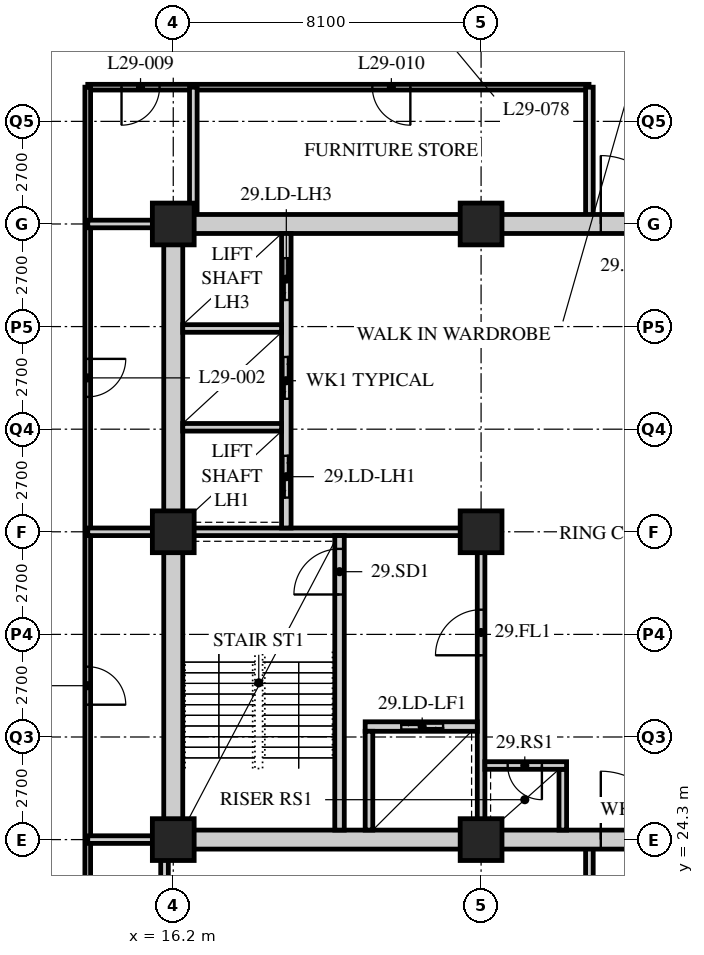
"""IFC4 building model, lengths in metres.
Left out: names, types, materials, properties, quantities, classifications, styles, units other than length and angle.
Written with IfcOpenShell. Run it as: python <this file> out.ifc"""

import sys

from ifc_helpers import new_model, si_unit, direction, frame, frame_2d, origin, origin_2d, place, context, subcontext, project, spatial, rectangle, hollow_rectangle, extrude, element, fill, save


model = new_model("IFC4")
c1 = context("Model", 3, precision=1e-05, world=origin(), true_north=direction((0.0, 1.0)))
c2 = subcontext(c1, "Body", "Model", "MODEL_VIEW")
j1 = project(units=[si_unit("LENGTHUNIT", "METRE"), si_unit("PLANEANGLEUNIT", "RADIAN")], contexts=[c1])
p1 = place(None, origin())
s1 = spatial("IfcSite", under=j1, at=p1, CompositionType="ELEMENT")
p2 = place(p1, origin())
s2 = spatial("IfcBuilding", under=s1, at=p2, CompositionType="ELEMENT")
p3 = place(p2, frame((0.0, 0.0, 117.0)))
s3 = spatial("IfcBuildingStorey", under=s2, at=p3, CompositionType="ELEMENT", Elevation=117.0)
for number, where, z_axis, x_axis in (
    (1, (16.2, 24.3, 0.0), (0.0, 0.0, 1.0), (1.0, 0.0, 0.0)),
    (2, (16.2, 32.4, 0.0), (0.0, 0.0, 1.0), (1.0, 0.0, 0.0)),
    (3, (16.2, 40.5, 0.0), (0.0, 0.0, 1.0), (1.0, 0.0, 0.0)),
    (4, (24.3, 24.3, 0.0), (0.0, 0.0, 1.0), (1.0, 0.0, 0.0)),
    (5, (24.3, 32.4, 0.0), (0.0, 0.0, 1.0), (1.0, 0.0, 0.0)),
    (6, (24.3, 40.5, 0.0), (0.0, 0.0, 1.0), (1.0, 0.0, 0.0)),
):
    element("IfcColumn", number, at=place(p3, frame(where, z_axis=z_axis, x_axis=x_axis)), inside=s3, PredefinedType="COLUMN", context=c2, shape_type="SweptSolid", body=[
        extrude(hollow_rectangle(XDim=1.1, YDim=1.1, WallThickness=0.1, at=origin_2d()), origin(), (0.0, 0.0, 1.0), 3.4),
    ])
p4 = place(p3, frame((27.14, 44.1, 0.0), z_axis=(0.0, 0.0, 1.0), x_axis=(-1.0, 0.0, 0.0)))
e7 = element("IfcWall", 7, at=p4, inside=s3, PredefinedType="PARTITIONING", context=c2, shape_type="SweptSolid", body=[
    extrude(rectangle(XDim=13.19, YDim=0.15, at=frame_2d((6.595, 0.0))), origin(), (0.0, 0.0, 1.0), 3.19),
])
p5 = place(p4, frame((11.301, 0.0, 0.0)))
e8 = element("IfcOpeningElement", 8, at=p5, cuts=e7, PredefinedType="OPENING", context=c2, shape_type="SweptSolid", body=[
    extrude(rectangle(XDim=1.0, YDim=2.1, at=frame_2d((0.5, 1.05))), frame((0.0, 0.085, 0.0), z_axis=(0.0, -1.0, 0.0), x_axis=(1.0, 0.0, 0.0)), (0.0, 0.0, 1.0), 0.17),
])
p6 = place(p4, frame((4.701, 0.0, 0.0)))
e9 = element("IfcOpeningElement", 9, at=p6, cuts=e7, PredefinedType="OPENING", context=c2, shape_type="SweptSolid", body=[
    extrude(rectangle(XDim=1.0, YDim=2.1, at=frame_2d((0.5, 1.05))), frame((0.0, 0.085, 0.0), z_axis=(0.0, -1.0, 0.0), x_axis=(1.0, 0.0, 0.0)), (0.0, 0.0, 1.0), 0.17),
])
p7 = place(p3, frame((13.95, 44.1, 0.0), z_axis=(0.0, 0.0, 1.0), x_axis=(0.0, -1.0, 0.0)))
e10 = element("IfcWall", 10, at=p7, inside=s3, PredefinedType="PARTITIONING", context=c2, shape_type="SweptSolid", body=[
    extrude(rectangle(XDim=24.75, YDim=0.15, at=frame_2d((12.375, 0.0))), origin(), (0.0, 0.0, 1.0), 3.19),
])
p8 = place(p7, frame((15.25, 0.0, 0.0)))
e11 = element("IfcOpeningElement", 11, at=p8, cuts=e10, PredefinedType="OPENING", context=c2, shape_type="SweptSolid", body=[
    extrude(rectangle(XDim=1.0, YDim=2.1, at=frame_2d((0.5, 1.05))), frame((0.0, 0.085, 0.0), z_axis=(0.0, -1.0, 0.0), x_axis=(1.0, 0.0, 0.0)), (0.0, 0.0, 1.0), 0.17),
])
p9 = place(p7, frame((7.15, 0.0, 0.0)))
e12 = element("IfcOpeningElement", 12, at=p9, cuts=e10, PredefinedType="OPENING", context=c2, shape_type="SweptSolid", body=[
    extrude(rectangle(XDim=1.0, YDim=2.1, at=frame_2d((0.5, 1.05))), frame((0.0, 0.085, 0.0), z_axis=(0.0, -1.0, 0.0), x_axis=(1.0, 0.0, 0.0)), (0.0, 0.0, 1.0), 0.17),
])
p10 = place(p3, frame((13.95, 32.4, 0.0), z_axis=(0.0, 0.0, 1.0), x_axis=(1.0, 0.0, 0.0)))
e13 = element("IfcWall", 13, at=p10, inside=s3, PredefinedType="SOLIDWALL", context=c2, shape_type="SweptSolid", body=[
    extrude(rectangle(XDim=2.25, YDim=0.2, at=frame_2d((1.125, 0.0))), origin(), (0.0, 0.0, 1.0), 3.19),
])
p11 = place(p3, frame((15.97, 19.35, 0.0), z_axis=(0.0, 0.0, 1.0), x_axis=(0.0, 1.0, 0.0)))
e14 = element("IfcWall", 14, at=p11, inside=s3, PredefinedType="SOLIDWALL", context=c2, shape_type="SweptSolid", body=[
    extrude(rectangle(XDim=4.95, YDim=0.2, at=frame_2d((2.475, 0.0))), origin(), (0.0, 0.0, 1.0), 2.49),
])
p12 = place(p3, frame((27.15, 19.35, 0.0), z_axis=(0.0, 0.0, 1.0), x_axis=(0.0, 1.0, 0.0)))
e15 = element("IfcWall", 15, at=p12, inside=s3, PredefinedType="SOLIDWALL", context=c2, shape_type="SweptSolid", body=[
    extrude(rectangle(XDim=4.95, YDim=0.2, at=frame_2d((2.475, 0.0))), origin(), (0.0, 0.0, 1.0), 3.19),
])
for number, where, z_axis, x_axis in (
    (16, (16.728, 44.1, 0.0), (0.0, 0.0, 1.0), (0.0, -1.0, 0.0)),
    (17, (27.15, 40.5, 0.0), (0.0, 0.0, 1.0), (0.0, 1.0, 0.0)),
):
    element("IfcWall", number, at=place(p3, frame(where, z_axis=z_axis, x_axis=x_axis)), inside=s3, PredefinedType="SOLIDWALL", context=c2, shape_type="SweptSolid", body=[
        extrude(rectangle(XDim=3.6, YDim=0.2, at=frame_2d((1.8, 0.0))), origin(), (0.0, 0.0, 1.0), 3.19),
    ])
for number, where, z_axis, x_axis in (
    (18, (13.95, 24.3, 0.0), (0.0, 0.0, 1.0), (1.0, 0.0, 0.0)),
    (19, (13.95, 40.5, 0.0), (0.0, 0.0, 1.0), (1.0, 0.0, 0.0)),
):
    element("IfcWall", number, at=place(p3, frame(where, z_axis=z_axis, x_axis=x_axis)), inside=s3, PredefinedType="SOLIDWALL", context=c2, shape_type="SweptSolid", body=[
        extrude(rectangle(XDim=2.25, YDim=0.2, at=frame_2d((1.125, 0.0))), origin(), (0.0, 0.0, 1.0), 3.19),
    ])
p13 = place(p3, frame((15.95, 24.3, 0.0), z_axis=(0.0, 0.0, 1.0), x_axis=(1.0, 0.0, 0.0)))
e20 = element("IfcWall", 20, at=p13, inside=s3, PredefinedType="SOLIDWALL", context=c2, shape_type="SweptSolid", body=[
    extrude(rectangle(XDim=24.8, YDim=0.5, at=frame_2d((12.4, 0.0))), origin(), (0.0, 0.0, 1.0), 2.54),
])
p14 = place(p13, frame((11.5, 0.0, 0.0)))
e21 = element("IfcOpeningElement", 21, at=p14, cuts=e20, PredefinedType="OPENING", context=c2, shape_type="SweptSolid", body=[
    extrude(rectangle(XDim=1.8, YDim=2.4, at=frame_2d((0.9, 1.2))), frame((0.0, 0.26, 0.0), z_axis=(0.0, -1.0, 0.0), x_axis=(1.0, 0.0, 0.0)), (0.0, 0.0, 1.0), 0.52),
])
p15 = place(p3, frame((15.95, 40.5, 0.0), z_axis=(0.0, 0.0, 1.0), x_axis=(1.0, 0.0, 0.0)))
e22 = element("IfcWall", 22, at=p15, inside=s3, PredefinedType="SOLIDWALL", context=c2, shape_type="SweptSolid", body=[
    extrude(rectangle(XDim=24.8, YDim=0.5, at=frame_2d((12.4, 0.0))), origin(), (0.0, 0.0, 1.0), 2.54),
])
p16 = place(p15, frame((11.5, 0.0, 0.0)))
e23 = element("IfcOpeningElement", 23, at=p16, cuts=e22, PredefinedType="OPENING", context=c2, shape_type="SweptSolid", body=[
    extrude(rectangle(XDim=1.8, YDim=2.4, at=frame_2d((0.9, 1.2))), frame((0.0, 0.26, 0.0), z_axis=(0.0, -1.0, 0.0), x_axis=(1.0, 0.0, 0.0)), (0.0, 0.0, 1.0), 0.52),
])
p17 = place(p3, frame((16.2, 24.55, 0.0), z_axis=(0.0, 0.0, 1.0), x_axis=(0.0, 1.0, 0.0)))
e24 = element("IfcWall", 24, at=p17, inside=s3, PredefinedType="SOLIDWALL", context=c2, shape_type="SweptSolid", body=[
    extrude(rectangle(XDim=15.7, YDim=0.5, at=frame_2d((7.85, 0.0))), origin(), (0.0, 0.0, 1.0), 2.578),
])
p18 = place(p3, frame((16.45, 32.4, 0.0), z_axis=(0.0, 0.0, 1.0), x_axis=(1.0, 0.0, 0.0)))
e25 = element("IfcWall", 25, at=p18, inside=s3, PredefinedType="SOLIDWALL", context=c2, shape_type="SweptSolid", body=[
    extrude(rectangle(XDim=7.95, YDim=0.2, at=frame_2d((3.975, 0.0))), origin(), (0.0, 0.0, 1.0), 2.578),
])
p19 = place(p3, frame((24.3, 24.55, 0.0), z_axis=(0.0, 0.0, 1.0), x_axis=(0.0, 1.0, 0.0)))
e26 = element("IfcWall", 26, at=p19, inside=s3, PredefinedType="SOLIDWALL", context=c2, shape_type="SweptSolid", body=[
    extrude(rectangle(XDim=7.75, YDim=0.2, at=frame_2d((3.875, 0.0))), origin(), (0.0, 0.0, 1.0), 2.578),
])
p20 = place(p19, frame((4.6, 0.0, 0.0)))
e27 = element("IfcOpeningElement", 27, at=p20, cuts=e26, PredefinedType="OPENING", context=c2, shape_type="SweptSolid", body=[
    extrude(rectangle(XDim=1.2, YDim=2.1, at=frame_2d((0.6, 1.05))), frame((0.0, 0.11, 0.0), z_axis=(0.0, -1.0, 0.0), x_axis=(1.0, 0.0, 0.0)), (0.0, 0.0, 1.0), 0.22),
])
p21 = place(p3, frame((20.575, 24.55, 0.0), z_axis=(0.0, 0.0, 1.0), x_axis=(0.0, 1.0, 0.0)))
e28 = element("IfcWall", 28, at=p21, inside=s3, PredefinedType="SOLIDWALL", context=c2, shape_type="SweptSolid", body=[
    extrude(rectangle(XDim=7.75, YDim=0.25, at=frame_2d((3.875, 0.0))), origin(), (0.0, 0.0, 1.0), 3.19),
])
p22 = place(p21, frame((6.2, 0.0, 0.0)))
e29 = element("IfcOpeningElement", 29, at=p22, cuts=e28, PredefinedType="OPENING", context=c2, shape_type="SweptSolid", body=[
    extrude(rectangle(XDim=1.2, YDim=2.1, at=frame_2d((0.6, 1.05))), frame((0.0, 0.135, 0.0), z_axis=(0.0, -1.0, 0.0), x_axis=(1.0, 0.0, 0.0)), (0.0, 0.0, 1.0), 0.27),
])
p23 = place(p3, frame((21.25, 27.275, 0.0), z_axis=(0.0, 0.0, 1.0), x_axis=(1.0, 0.0, 0.0)))
e30 = element("IfcWall", 30, at=p23, inside=s3, PredefinedType="SOLIDWALL", context=c2, shape_type="SweptSolid", body=[
    extrude(rectangle(XDim=2.95, YDim=0.25, at=frame_2d((1.475, 0.0))), origin(), (0.0, 0.0, 1.0), 3.19),
])
p24 = place(p23, frame((0.95, 0.0, 0.0)))
e31 = element("IfcOpeningElement", 31, at=p24, cuts=e30, PredefinedType="OPENING", context=c2, shape_type="SweptSolid", body=[
    extrude(rectangle(XDim=1.1, YDim=2.4, at=frame_2d((0.55, 1.2))), frame((0.0, 0.135, 0.0), z_axis=(0.0, -1.0, 0.0), x_axis=(1.0, 0.0, 0.0)), (0.0, 0.0, 1.0), 0.27),
])
p25 = place(p3, frame((21.35, 24.55, 0.0), z_axis=(0.0, 0.0, 1.0), x_axis=(0.0, 1.0, 0.0)))
e32 = element("IfcWall", 32, at=p25, inside=s3, PredefinedType="SOLIDWALL", context=c2, shape_type="SweptSolid", body=[
    extrude(rectangle(XDim=2.6, YDim=0.2, at=frame_2d((1.3, 0.0))), origin(), (0.0, 0.0, 1.0), 3.19),
])
p26 = place(p3, frame((19.175, 32.5, 0.0), z_axis=(0.0, 0.0, 1.0), x_axis=(0.0, 1.0, 0.0)))
e33 = element("IfcWall", 33, at=p26, inside=s3, PredefinedType="SOLIDWALL", context=c2, shape_type="SweptSolid", body=[
    extrude(rectangle(XDim=7.75, YDim=0.25, at=frame_2d((3.875, 0.0))), origin(), (0.0, 0.0, 1.0), 3.19),
])
p27 = place(p26, frame((0.8, 0.0, 0.0)))
e34 = element("IfcOpeningElement", 34, at=p27, cuts=e33, PredefinedType="OPENING", context=c2, shape_type="SweptSolid", body=[
    extrude(rectangle(XDim=1.1, YDim=2.4, at=frame_2d((0.55, 1.2))), frame((0.0, 0.135, 0.0), z_axis=(0.0, -1.0, 0.0), x_axis=(1.0, 0.0, 0.0)), (0.0, 0.0, 1.0), 0.27),
])
p28 = place(p26, frame((3.4, 0.0, 0.0)))
e35 = element("IfcOpeningElement", 35, at=p28, cuts=e33, PredefinedType="OPENING", context=c2, shape_type="SweptSolid", body=[
    extrude(rectangle(XDim=1.1, YDim=2.4, at=frame_2d((0.55, 1.2))), frame((0.0, 0.135, 0.0), z_axis=(0.0, -1.0, 0.0), x_axis=(1.0, 0.0, 0.0)), (0.0, 0.0, 1.0), 0.27),
])
p29 = place(p26, frame((6.0, 0.0, 0.0)))
e36 = element("IfcOpeningElement", 36, at=p29, cuts=e33, PredefinedType="OPENING", context=c2, shape_type="SweptSolid", body=[
    extrude(rectangle(XDim=1.1, YDim=2.4, at=frame_2d((0.55, 1.2))), frame((0.0, 0.135, 0.0), z_axis=(0.0, -1.0, 0.0), x_axis=(1.0, 0.0, 0.0)), (0.0, 0.0, 1.0), 0.27),
])
for number, where, z_axis, x_axis in (
    (37, (16.45, 35.15, 0.0), (0.0, 0.0, 1.0), (1.0, 0.0, 0.0)),
    (38, (16.45, 37.75, 0.0), (0.0, 0.0, 1.0), (1.0, 0.0, 0.0)),
):
    element("IfcWall", number, at=place(p3, frame(where, z_axis=z_axis, x_axis=x_axis)), inside=s3, PredefinedType="SOLIDWALL", context=c2, shape_type="SweptSolid", body=[
        extrude(rectangle(XDim=2.6, YDim=0.2, at=frame_2d((1.3, 0.0))), origin(), (0.0, 0.0, 1.0), 3.19),
    ])
p30 = place(p3, frame((26.45, 24.55, 0.0), z_axis=(0.0, 0.0, 1.0), x_axis=(0.0, 1.0, 0.0)))
e39 = element("IfcWall", 39, at=p30, inside=s3, PredefinedType="SOLIDWALL", context=c2, shape_type="SweptSolid", body=[
    extrude(rectangle(XDim=1.6, YDim=0.2, at=frame_2d((0.8, 0.0))), origin(), (0.0, 0.0, 1.0), 3.19),
])
p31 = place(p3, frame((24.4, 26.25, 0.0), z_axis=(0.0, 0.0, 1.0), x_axis=(1.0, 0.0, 0.0)))
e40 = element("IfcWall", 40, at=p31, inside=s3, PredefinedType="SOLIDWALL", context=c2, shape_type="SweptSolid", body=[
    extrude(rectangle(XDim=2.15, YDim=0.2, at=frame_2d((1.075, 0.0))), origin(), (0.0, 0.0, 1.0), 3.19),
])
p32 = place(p31, frame((0.6, 0.0, 0.0)))
e41 = element("IfcOpeningElement", 41, at=p32, cuts=e40, PredefinedType="OPENING", context=c2, shape_type="SweptSolid", body=[
    extrude(rectangle(XDim=0.9, YDim=2.1, at=frame_2d((0.45, 1.05))), frame((0.0, 0.11, 0.0), z_axis=(0.0, -1.0, 0.0), x_axis=(1.0, 0.0, 0.0)), (0.0, 0.0, 1.0), 0.22),
])
p33 = place(p8, origin())
e42 = element("IfcDoor", 42, at=p33, inside=s3, OperationType="SINGLE_SWING_RIGHT", PredefinedType="DOOR", context=c2, shape_type="SweptSolid", body=[
    extrude(rectangle(XDim=1.0, YDim=2.1, at=frame_2d((0.5, 1.05))), frame((0.0, 0.025, 0.0), z_axis=(0.0, -1.0, 0.0), x_axis=(1.0, 0.0, 0.0)), (0.0, 0.0, 1.0), 0.05),
])
fill(e11, e42)
p34 = place(p9, origin())
e43 = element("IfcDoor", 43, at=p34, inside=s3, OperationType="SINGLE_SWING_LEFT", PredefinedType="DOOR", context=c2, shape_type="SweptSolid", body=[
    extrude(rectangle(XDim=1.0, YDim=2.1, at=frame_2d((0.5, 1.05))), frame((0.0, 0.025, 0.0), z_axis=(0.0, -1.0, 0.0), x_axis=(1.0, 0.0, 0.0)), (0.0, 0.0, 1.0), 0.05),
])
fill(e12, e43)
p35 = place(p5, origin())
e44 = element("IfcDoor", 44, at=p35, inside=s3, OperationType="SINGLE_SWING_RIGHT", PredefinedType="DOOR", context=c2, shape_type="SweptSolid", body=[
    extrude(rectangle(XDim=1.0, YDim=2.1, at=frame_2d((0.5, 1.05))), frame((0.0, 0.025, 0.0), z_axis=(0.0, -1.0, 0.0), x_axis=(1.0, 0.0, 0.0)), (0.0, 0.0, 1.0), 0.05),
])
fill(e8, e44)
p36 = place(p6, origin())
e45 = element("IfcDoor", 45, at=p36, inside=s3, OperationType="SINGLE_SWING_LEFT", PredefinedType="DOOR", context=c2, shape_type="SweptSolid", body=[
    extrude(rectangle(XDim=1.0, YDim=2.1, at=frame_2d((0.5, 1.05))), frame((0.0, 0.025, 0.0), z_axis=(0.0, -1.0, 0.0), x_axis=(1.0, 0.0, 0.0)), (0.0, 0.0, 1.0), 0.05),
])
fill(e9, e45)
p37 = place(p22, origin())
e46 = element("IfcDoor", 46, at=p37, inside=s3, OperationType="SINGLE_SWING_LEFT", PredefinedType="DOOR", context=c2, shape_type="SweptSolid", body=[
    extrude(rectangle(XDim=1.2, YDim=2.1, at=frame_2d((0.6, 1.05))), frame((0.0, 0.025, 0.0), z_axis=(0.0, -1.0, 0.0), x_axis=(1.0, 0.0, 0.0)), (0.0, 0.0, 1.0), 0.05),
])
fill(e29, e46)
p38 = place(p20, origin())
e47 = element("IfcDoor", 47, at=p38, inside=s3, OperationType="SINGLE_SWING_LEFT", PredefinedType="DOOR", context=c2, shape_type="SweptSolid", body=[
    extrude(rectangle(XDim=1.2, YDim=2.1, at=frame_2d((0.6, 1.05))), frame((0.0, 0.025, 0.0), z_axis=(0.0, -1.0, 0.0), x_axis=(1.0, 0.0, 0.0)), (0.0, 0.0, 1.0), 0.05),
])
fill(e27, e47)
p39 = place(p32, origin())
e48 = element("IfcDoor", 48, at=p39, inside=s3, OperationType="SINGLE_SWING_LEFT", PredefinedType="DOOR", context=c2, shape_type="SweptSolid", body=[
    extrude(rectangle(XDim=0.9, YDim=2.1, at=frame_2d((0.45, 1.05))), frame((0.0, 0.025, 0.0), z_axis=(0.0, -1.0, 0.0), x_axis=(1.0, 0.0, 0.0)), (0.0, 0.0, 1.0), 0.05),
])
fill(e41, e48)
p40 = place(p27, origin())
e49 = element("IfcDoor", 49, at=p40, inside=s3, OperationType="DOUBLE_DOOR_SLIDING", PredefinedType="DOOR", context=c2, shape_type="SweptSolid", body=[
    extrude(rectangle(XDim=1.1, YDim=2.4, at=frame_2d((0.55, 1.2))), frame((0.0, 0.025, 0.0), z_axis=(0.0, -1.0, 0.0), x_axis=(1.0, 0.0, 0.0)), (0.0, 0.0, 1.0), 0.05),
])
fill(e34, e49)
p41 = place(p28, origin())
e50 = element("IfcDoor", 50, at=p41, inside=s3, OperationType="DOUBLE_DOOR_SLIDING", PredefinedType="DOOR", context=c2, shape_type="SweptSolid", body=[
    extrude(rectangle(XDim=1.1, YDim=2.4, at=frame_2d((0.55, 1.2))), frame((0.0, 0.025, 0.0), z_axis=(0.0, -1.0, 0.0), x_axis=(1.0, 0.0, 0.0)), (0.0, 0.0, 1.0), 0.05),
])
fill(e35, e50)
p42 = place(p29, origin())
e51 = element("IfcDoor", 51, at=p42, inside=s3, OperationType="DOUBLE_DOOR_SLIDING", PredefinedType="DOOR", context=c2, shape_type="SweptSolid", body=[
    extrude(rectangle(XDim=1.1, YDim=2.4, at=frame_2d((0.55, 1.2))), frame((0.0, 0.025, 0.0), z_axis=(0.0, -1.0, 0.0), x_axis=(1.0, 0.0, 0.0)), (0.0, 0.0, 1.0), 0.05),
])
fill(e36, e51)
p43 = place(p24, origin())
e52 = element("IfcDoor", 52, at=p43, inside=s3, OperationType="DOUBLE_DOOR_SLIDING", PredefinedType="DOOR", context=c2, shape_type="SweptSolid", body=[
    extrude(rectangle(XDim=1.1, YDim=2.4, at=frame_2d((0.55, 1.2))), frame((0.0, 0.025, 0.0), z_axis=(0.0, -1.0, 0.0), x_axis=(1.0, 0.0, 0.0)), (0.0, 0.0, 1.0), 0.05),
])
fill(e31, e52)
p44 = place(p14, origin())
e53 = element("IfcDoor", 53, at=p44, inside=s3, OperationType="DOUBLE_DOOR_SINGLE_SWING", PredefinedType="DOOR", context=c2, shape_type="SweptSolid", body=[
    extrude(rectangle(XDim=1.8, YDim=2.4, at=frame_2d((0.9, 1.2))), frame((0.0, 0.025, 0.0), z_axis=(0.0, -1.0, 0.0), x_axis=(1.0, 0.0, 0.0)), (0.0, 0.0, 1.0), 0.05),
])
fill(e21, e53)
p45 = place(p16, origin())
e54 = element("IfcDoor", 54, at=p45, inside=s3, OperationType="DOUBLE_DOOR_SINGLE_SWING", PredefinedType="DOOR", context=c2, shape_type="SweptSolid", body=[
    extrude(rectangle(XDim=1.8, YDim=2.4, at=frame_2d((0.9, 1.2))), frame((0.0, 0.025, 0.0), z_axis=(0.0, -1.0, 0.0), x_axis=(1.0, 0.0, 0.0)), (0.0, 0.0, 1.0), 0.05),
])
fill(e23, e54)
save(model, sys.argv[1])
